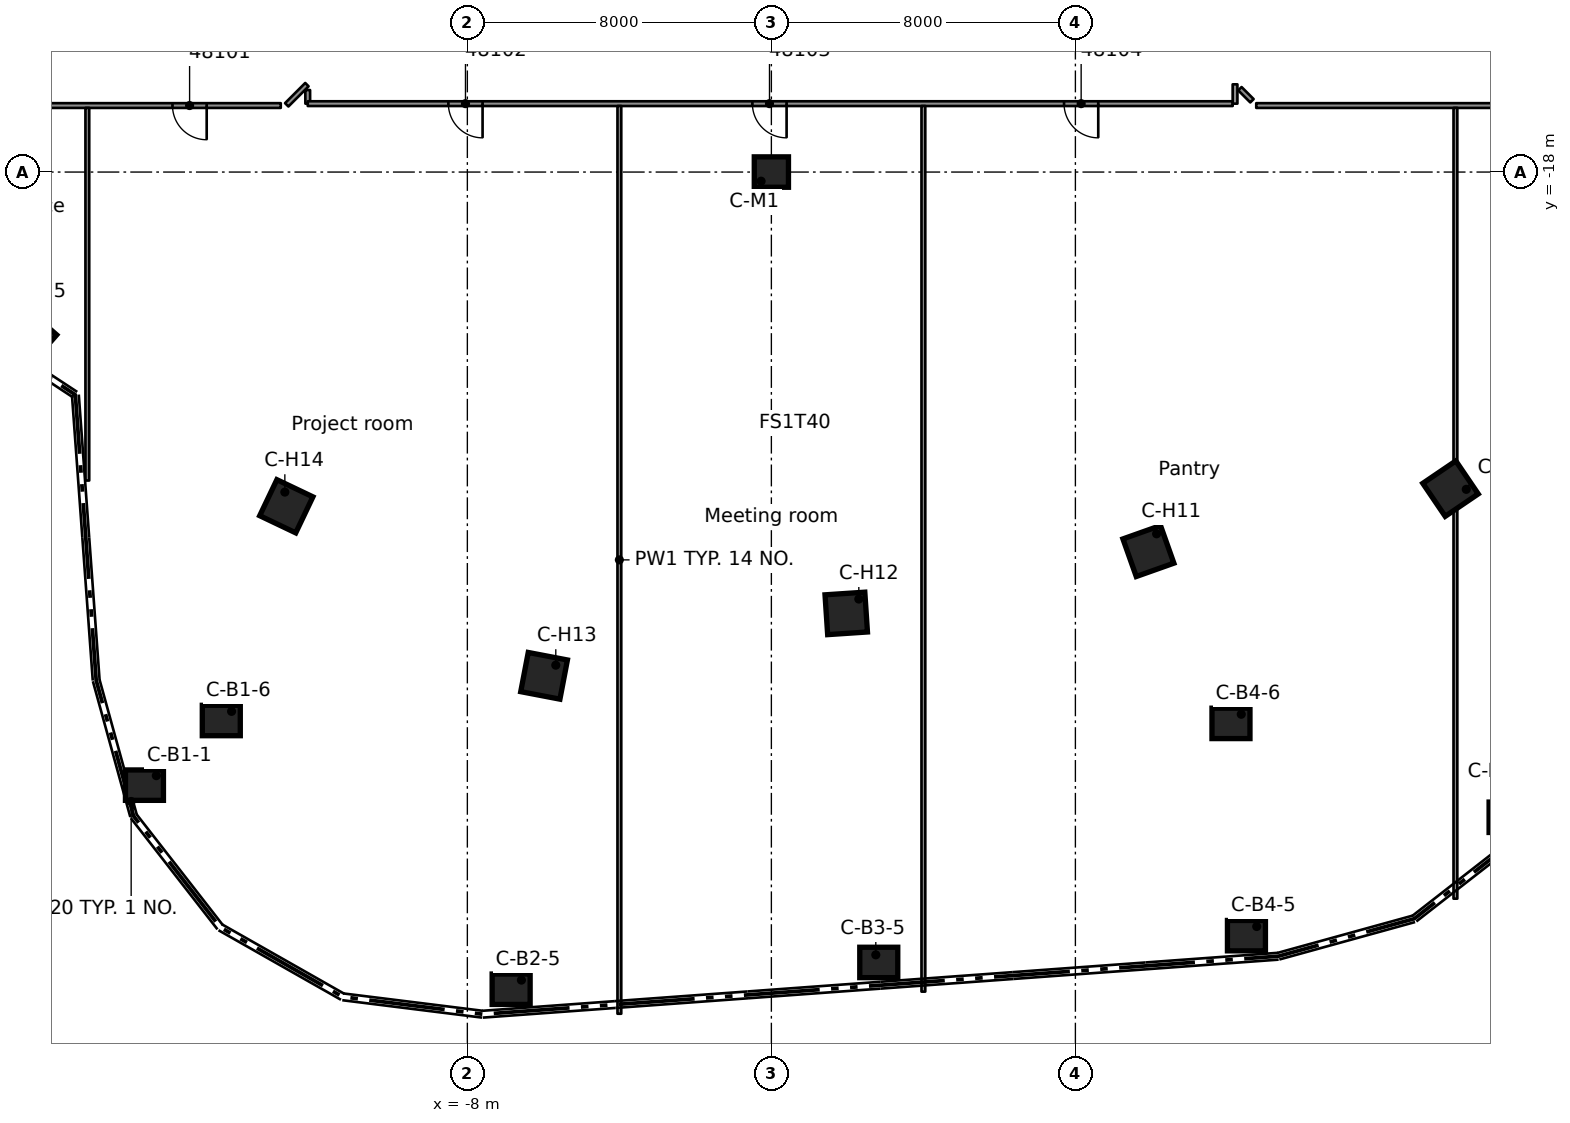
"""IFC4 building model, lengths in metres.
Left out: names, types, materials, properties, quantities, classifications, styles, units other than length and angle.
Written with IfcOpenShell. Run it as: python <this file> out.ifc"""

import sys

from ifc_helpers import new_model, si_unit, direction, frame, frame_2d, origin, origin_2d, place, context, subcontext, project, spatial, rectangle, extrude, element, fill, save


model = new_model("IFC4")
c1 = context("Model", 3, precision=1e-05, world=origin(), true_north=direction((0.0, 1.0)))
c2 = subcontext(c1, "Body", "Model", "MODEL_VIEW")
j1 = project(units=[si_unit("LENGTHUNIT", "METRE"), si_unit("PLANEANGLEUNIT", "RADIAN")], contexts=[c1])
p1 = place(None, origin())
s1 = spatial("IfcSite", under=j1, at=p1, CompositionType="ELEMENT")
p2 = place(p1, origin())
s2 = spatial("IfcBuilding", under=s1, at=p2, CompositionType="ELEMENT")
p3 = place(p2, frame((0.0, 0.0, 235.5)))
s3 = spatial("IfcBuildingStorey", under=s2, at=p3, CompositionType="ELEMENT", Elevation=235.5)
for number, where, z_axis, x_axis in (
    (1, (-16.497, -34.132, 0.0), (0.0, 0.0, 1.0), (1.0, 0.0, 0.0)),
    (2, (-14.475, -32.431, 0.0), (0.0, 0.0, 1.0), (1.0, 0.0, 0.0)),
    (3, (-6.848, -39.502, 0.0), (0.0, 0.0, 1.0), (1.0, 0.0, 0.0)),
    (4, (2.826, -38.797, 0.0), (0.0, 0.0, 1.0), (1.0, 0.0, 0.0)),
    (5, (12.501, -38.092, 0.0), (0.0, 0.0, 1.0), (1.0, 0.0, 0.0)),
    (6, (12.094, -32.507, 0.0), (0.0, 0.0, 1.0), (1.0, 0.0, 0.0)),
    (7, (19.386, -34.977, 0.0), (0.0, 0.0, 1.0), (1.0, 0.0, 0.0)),
):
    element("IfcColumn", number, at=place(p3, frame(where, z_axis=z_axis, x_axis=x_axis)), inside=s3, PredefinedType="COLUMN", context=c2, shape_type="SweptSolid", body=[
        extrude(rectangle(XDim=1.0, YDim=0.8, at=origin_2d()), origin(), (0.0, 0.0, 1.0), 3.5),
    ])
for number, where, z_axis, x_axis in (
    (8, (17.871, -26.33, 0.0), (0.0, 0.0, 1.0), (0.562, -0.827, 0.0)),
    (9, (9.921, -27.972, 0.0), (0.0, 0.0, 1.0), (0.334, -0.942, 0.0)),
    (10, (1.97, -29.613, 0.0), (0.0, 0.0, 1.0), (0.066, -0.998, 0.0)),
    (11, (-5.981, -31.255, 0.0), (0.0, 0.0, 1.0), (-0.188, -0.982, 0.0)),
    (12, (-12.764, -26.794, 0.0), (0.0, 0.0, 1.0), (-0.43, -0.903, 0.0)),
    (13, (-19.547, -22.333, 0.0), (0.0, 0.0, 1.0), (-0.659, -0.752, 0.0)),
):
    element("IfcColumn", number, at=place(p3, frame(where, z_axis=z_axis, x_axis=x_axis)), inside=s3, PredefinedType="COLUMN", context=c2, shape_type="SweptSolid", body=[
        extrude(rectangle(XDim=1.05, YDim=1.05, at=origin_2d()), origin(), (0.0, 0.0, 1.0), 3.5),
    ])
p4 = place(p3, frame((0.0, -18.0, 0.0), z_axis=(0.0, 0.0, 1.0), x_axis=(1.0, 0.0, 0.0)))
e14 = element("IfcColumn", 14, at=p4, inside=s3, PredefinedType="COLUMN", context=c2, shape_type="SweptSolid", body=[
    extrude(rectangle(XDim=0.9, YDim=0.8, at=origin_2d()), origin(), (0.0, 0.0, 1.0), 3.5),
])
p5 = place(p3, frame((-12.201, -15.842, 0.0), z_axis=(0.0, 0.0, 1.0), x_axis=(0.002728502804, -0.999996277629, 0.0)))
e15 = element("IfcWall", 15, at=p5, inside=s3, PredefinedType="PARTITIONING", context=c2, shape_type="SweptSolid", body=[
    extrude(rectangle(XDim=0.358, YDim=0.125, at=frame_2d((0.179, 0.0))), origin(), (0.0, 0.0, 1.0), 3.08),
])
p6 = place(p3, frame((12.329, -15.807, 0.0), z_axis=(0.0, 0.0, 1.0), x_axis=(0.706834450471, -0.707379007059, 0.0)))
e16 = element("IfcWall", 16, at=p6, inside=s3, PredefinedType="PARTITIONING", context=c2, shape_type="SweptSolid", body=[
    extrude(rectangle(XDim=0.448, YDim=0.125, at=frame_2d((0.224, 0.0))), origin(), (0.0, 0.0, 1.0), 3.08),
])
p7 = place(p3, frame((-12.91, -16.25, 0.0), z_axis=(0.0, 0.0, 1.0), x_axis=(-1.0, 0.0, 0.0)))
e17 = element("IfcWall", 17, at=p7, inside=s3, PredefinedType="PARTITIONING", context=c2, shape_type="SweptSolid", body=[
    extrude(rectangle(XDim=10.278, YDim=0.125, at=frame_2d((5.139, 0.0))), origin(), (0.0, 0.0, 1.0), 3.08),
])
p8 = place(p7, frame((7.19, 0.0, 0.0)))
e18 = element("IfcOpeningElement", 18, at=p8, cuts=e17, PredefinedType="OPENING", context=c2, shape_type="SweptSolid", body=[
    extrude(rectangle(XDim=1.0, YDim=2.1, at=frame_2d((0.5, 1.05))), frame((0.0, 0.073, 0.0), z_axis=(0.0, -1.0, 0.0), x_axis=(1.0, 0.0, 0.0)), (0.0, 0.0, 1.0), 0.145),
])
p9 = place(p7, frame((1.949, 0.0, 0.0)))
e19 = element("IfcOpeningElement", 19, at=p9, cuts=e17, PredefinedType="OPENING", context=c2, shape_type="SweptSolid", body=[
    extrude(rectangle(XDim=0.9, YDim=2.1, at=frame_2d((0.45, 1.05))), frame((0.0, 0.073, 0.0), z_axis=(0.0, -1.0, 0.0), x_axis=(1.0, 0.0, 0.0)), (0.0, 0.0, 1.0), 0.145),
])
p10 = place(p3, frame((12.759, -16.25, 0.0), z_axis=(0.0, 0.0, 1.0), x_axis=(1.0, 0.0, 0.0)))
e20 = element("IfcWall", 20, at=p10, inside=s3, PredefinedType="PARTITIONING", context=c2, shape_type="SweptSolid", body=[
    extrude(rectangle(XDim=10.43, YDim=0.125, at=frame_2d((5.215, 0.0))), origin(), (0.0, 0.0, 1.0), 3.08),
])
p11 = place(p3, frame((12.139, -16.2, 0.0), z_axis=(0.0, 0.0, 1.0), x_axis=(-1.0, 0.0, 0.0)))
e21 = element("IfcWall", 21, at=p11, inside=s3, PredefinedType="PARTITIONING", context=c2, shape_type="SweptSolid", body=[
    extrude(rectangle(XDim=24.339, YDim=0.125, at=frame_2d((12.169, 0.0))), origin(), (0.0, 0.0, 1.0), 3.08),
])
p12 = place(p11, frame((19.739, 0.0, 0.0)))
e22 = element("IfcOpeningElement", 22, at=p12, cuts=e21, PredefinedType="OPENING", context=c2, shape_type="SweptSolid", body=[
    extrude(rectangle(XDim=0.9, YDim=2.1, at=frame_2d((0.45, 1.05))), frame((0.0, 0.073, 0.0), z_axis=(0.0, -1.0, 0.0), x_axis=(1.0, 0.0, 0.0)), (0.0, 0.0, 1.0), 0.145),
])
p13 = place(p11, frame((11.739, 0.0, 0.0)))
e23 = element("IfcOpeningElement", 23, at=p13, cuts=e21, PredefinedType="OPENING", context=c2, shape_type="SweptSolid", body=[
    extrude(rectangle(XDim=0.9, YDim=2.1, at=frame_2d((0.45, 1.05))), frame((0.0, 0.073, 0.0), z_axis=(0.0, -1.0, 0.0), x_axis=(1.0, 0.0, 0.0)), (0.0, 0.0, 1.0), 0.145),
])
p14 = place(p11, frame((3.538, 0.0, 0.0)))
e24 = element("IfcOpeningElement", 24, at=p14, cuts=e21, PredefinedType="OPENING", context=c2, shape_type="SweptSolid", body=[
    extrude(rectangle(XDim=0.9, YDim=2.1, at=frame_2d((0.45, 1.05))), frame((0.0, 0.073, 0.0), z_axis=(0.0, -1.0, 0.0), x_axis=(1.0, 0.0, 0.0)), (0.0, 0.0, 1.0), 0.145),
])
p15 = place(p3, frame((-12.753, -16.231, 0.0), z_axis=(0.0, 0.0, 1.0), x_axis=(0.707106781187, 0.707106781187, 0.0)))
e25 = element("IfcWall", 25, at=p15, inside=s3, PredefinedType="PARTITIONING", context=c2, shape_type="SweptSolid", body=[
    extrude(rectangle(XDim=0.751, YDim=0.125, at=frame_2d((0.375, 0.0))), origin(), (0.0, 0.0, 1.0), 3.08),
])
p16 = place(p3, frame((18.0, -37.119, 0.0), z_axis=(0.0, 0.0, 1.0), x_axis=(0.0, 1.0, 0.0)))
e26 = element("IfcWall", 26, at=p16, inside=s3, PredefinedType="PARTITIONING", context=c2, shape_type="SweptSolid", body=[
    extrude(rectangle(XDim=20.807, YDim=0.1, at=frame_2d((10.403, 0.0))), origin(), (0.0, 0.0, 1.0), 3.08),
])
p17 = place(p3, frame((12.201, -16.2, 0.0), z_axis=(0.0, 0.0, 1.0), x_axis=(0.0, 1.0, 0.0)))
e27 = element("IfcWall", 27, at=p17, inside=s3, PredefinedType="PARTITIONING", context=c2, shape_type="SweptSolid", body=[
    extrude(rectangle(XDim=0.508, YDim=0.125, at=frame_2d((0.254, 0.0))), origin(), (0.0, 0.0, 1.0), 3.08),
])
p18 = place(p3, frame((4.0, -39.565, 0.0), z_axis=(0.0, 0.0, 1.0), x_axis=(0.0, 1.0, 0.0)))
e28 = element("IfcWall", 28, at=p18, inside=s3, PredefinedType="PARTITIONING", context=c2, shape_type="SweptSolid", body=[
    extrude(rectangle(XDim=23.303, YDim=0.1, at=frame_2d((11.651, 0.0))), origin(), (0.0, 0.0, 1.0), 3.08),
])
p19 = place(p3, frame((-4.0, -40.147, 0.0), z_axis=(0.0, 0.0, 1.0), x_axis=(0.0, 1.0, 0.0)))
e29 = element("IfcWall", 29, at=p19, inside=s3, PredefinedType="PARTITIONING", context=c2, shape_type="SweptSolid", body=[
    extrude(rectangle(XDim=23.885, YDim=0.1, at=frame_2d((11.942, 0.0))), origin(), (0.0, 0.0, 1.0), 3.08),
])
p20 = place(p3, frame((-18.0, -26.117, 0.0), z_axis=(0.0, 0.0, 1.0), x_axis=(0.0, 1.0, 0.0)))
e30 = element("IfcWall", 30, at=p20, inside=s3, PredefinedType="PARTITIONING", context=c2, shape_type="SweptSolid", body=[
    extrude(rectangle(XDim=9.805, YDim=0.1, at=frame_2d((4.902, 0.0))), origin(), (0.0, 0.0, 1.0), 3.08),
])
p21 = place(p9, origin())
e31 = element("IfcDoor", 31, at=p21, inside=s3, OperationType="SINGLE_SWING_LEFT", PredefinedType="DOOR", context=c2, shape_type="SweptSolid", body=[
    extrude(rectangle(XDim=0.9, YDim=2.1, at=frame_2d((0.45, 1.05))), frame((0.0, 0.025, 0.0), z_axis=(0.0, -1.0, 0.0), x_axis=(1.0, 0.0, 0.0)), (0.0, 0.0, 1.0), 0.05),
])
fill(e19, e31)
p22 = place(p12, origin())
e32 = element("IfcDoor", 32, at=p22, inside=s3, OperationType="SINGLE_SWING_RIGHT", PredefinedType="DOOR", context=c2, shape_type="SweptSolid", body=[
    extrude(rectangle(XDim=0.9, YDim=2.1, at=frame_2d((0.45, 1.05))), frame((0.0, 0.025, 0.0), z_axis=(0.0, -1.0, 0.0), x_axis=(1.0, 0.0, 0.0)), (0.0, 0.0, 1.0), 0.05),
])
fill(e22, e32)
p23 = place(p13, origin())
e33 = element("IfcDoor", 33, at=p23, inside=s3, OperationType="SINGLE_SWING_RIGHT", PredefinedType="DOOR", context=c2, shape_type="SweptSolid", body=[
    extrude(rectangle(XDim=0.9, YDim=2.1, at=frame_2d((0.45, 1.05))), frame((0.0, 0.025, 0.0), z_axis=(0.0, -1.0, 0.0), x_axis=(1.0, 0.0, 0.0)), (0.0, 0.0, 1.0), 0.05),
])
fill(e23, e33)
p24 = place(p14, origin())
e34 = element("IfcDoor", 34, at=p24, inside=s3, OperationType="SINGLE_SWING_LEFT", PredefinedType="DOOR", context=c2, shape_type="SweptSolid", body=[
    extrude(rectangle(XDim=0.9, YDim=2.1, at=frame_2d((0.45, 1.05))), frame((0.0, 0.025, 0.0), z_axis=(0.0, -1.0, 0.0), x_axis=(1.0, 0.0, 0.0)), (0.0, 0.0, 1.0), 0.05),
])
fill(e24, e34)
save(model, sys.argv[1])
